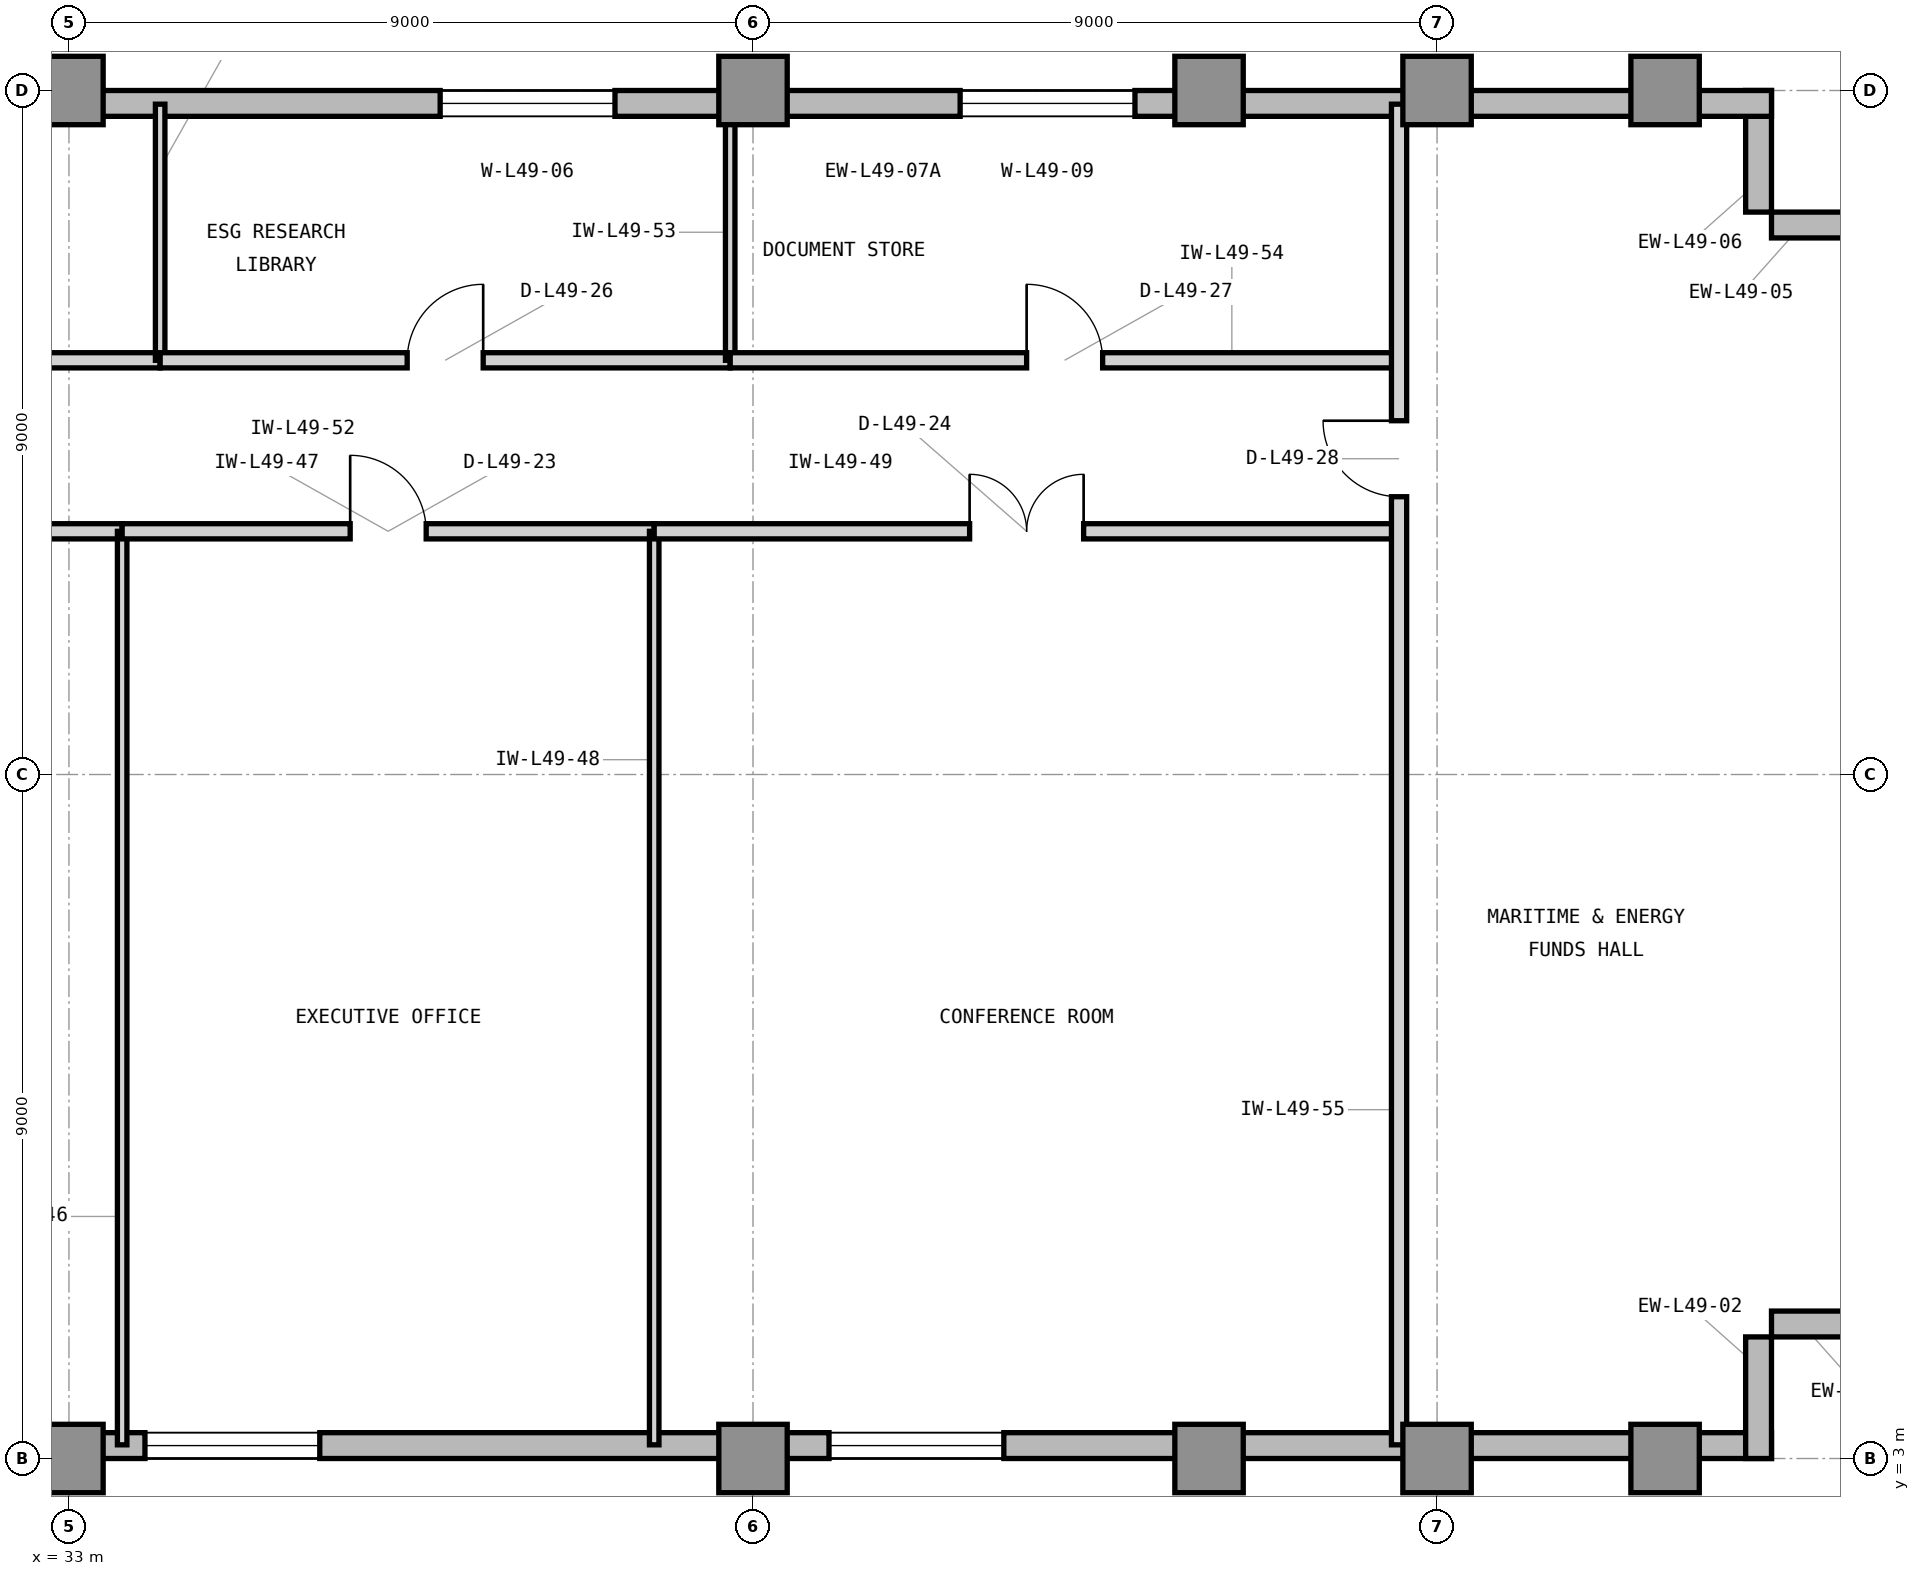
"""IFC4 building model, lengths in metres.
Left out: names, types, materials, properties, quantities, classifications, styles, units other than length and angle.
Written with IfcOpenShell. Run it as: python <this file> out.ifc"""

import sys

from ifc_helpers import new_model, si_unit, direction, frame, frame_2d, origin, origin_2d, place, context, subcontext, project, spatial, rectangle, extrude, element, fill, save


model = new_model("IFC4")
c1 = context("Model", 3, precision=1e-05, world=origin(), true_north=direction((0.0, 1.0)))
c2 = subcontext(c1, "Body", "Model", "MODEL_VIEW")
j1 = project(units=[si_unit("LENGTHUNIT", "METRE"), si_unit("PLANEANGLEUNIT", "RADIAN")], contexts=[c1])
p1 = place(None, origin())
s1 = spatial("IfcSite", under=j1, at=p1, CompositionType="ELEMENT")
p2 = place(p1, origin())
s2 = spatial("IfcBuilding", under=s1, at=p2, CompositionType="ELEMENT")
p3 = place(p2, frame((0.0, 0.0, 203.4)))
s3 = spatial("IfcBuildingStorey", under=s2, at=p3, CompositionType="ELEMENT", Elevation=203.4)
for number, where, z_axis, x_axis in (
    (1, (33.0, 3.0, 0.0), (0.0, 0.0, 1.0), (1.0, 0.0, 0.0)),
    (2, (33.0, 21.0, 0.0), (0.0, 0.0, 1.0), (1.0, 0.0, 0.0)),
    (3, (42.0, 3.0, 0.0), (0.0, 0.0, 1.0), (1.0, 0.0, 0.0)),
    (4, (42.0, 21.0, 0.0), (0.0, 0.0, 1.0), (1.0, 0.0, 0.0)),
    (5, (48.0, 3.0, 0.0), (0.0, 0.0, 1.0), (1.0, 0.0, 0.0)),
    (6, (48.0, 21.0, 0.0), (0.0, 0.0, 1.0), (1.0, 0.0, 0.0)),
    (7, (51.0, 3.0, 0.0), (0.0, 0.0, 1.0), (1.0, 0.0, 0.0)),
    (8, (51.0, 21.0, 0.0), (0.0, 0.0, 1.0), (1.0, 0.0, 0.0)),
    (9, (54.0, 3.0, 0.0), (0.0, 0.0, 1.0), (1.0, 0.0, 0.0)),
    (10, (54.0, 21.0, 0.0), (0.0, 0.0, 1.0), (1.0, 0.0, 0.0)),
):
    element("IfcColumn", number, at=place(p3, frame(where, z_axis=z_axis, x_axis=x_axis)), inside=s3, PredefinedType="COLUMN", context=c2, shape_type="SweptSolid", body=[
        extrude(rectangle(XDim=0.9, YDim=0.9, at=origin_2d()), origin(), (0.0, 0.0, 1.0), 3.9),
    ])
p4 = place(p3, frame((23.9, 3.17, 0.0), z_axis=(0.0, 0.0, 1.0), x_axis=(1.0, 0.0, 0.0)))
e11 = element("IfcWall", 11, at=p4, inside=s3, PredefinedType="STANDARD", context=c2, shape_type="SweptSolid", body=[
    extrude(rectangle(XDim=31.5, YDim=0.34, at=frame_2d((15.75, 0.0))), origin(), (0.0, 0.0, 1.0), 3.7),
])
p5 = place(p4, frame((5.6, 0.0, 0.9)))
e12 = element("IfcOpeningElement", 12, at=p5, cuts=e11, PredefinedType="OPENING", context=c2, shape_type="SweptSolid", body=[
    extrude(rectangle(XDim=2.3, YDim=2.2, at=frame_2d((1.15, 1.1))), frame((0.0, 0.18, 0.0), z_axis=(0.0, -1.0, 0.0), x_axis=(1.0, 0.0, 0.0)), (0.0, 0.0, 1.0), 0.36),
])
p6 = place(p4, frame((10.1, 0.0, 0.9)))
e13 = element("IfcOpeningElement", 13, at=p6, cuts=e11, PredefinedType="OPENING", context=c2, shape_type="SweptSolid", body=[
    extrude(rectangle(XDim=2.3, YDim=2.2, at=frame_2d((1.15, 1.1))), frame((0.0, 0.18, 0.0), z_axis=(0.0, -1.0, 0.0), x_axis=(1.0, 0.0, 0.0)), (0.0, 0.0, 1.0), 0.36),
])
p7 = place(p4, frame((19.1, 0.0, 0.9)))
e14 = element("IfcOpeningElement", 14, at=p7, cuts=e11, PredefinedType="OPENING", context=c2, shape_type="SweptSolid", body=[
    extrude(rectangle(XDim=2.3, YDim=2.2, at=frame_2d((1.15, 1.1))), frame((0.0, 0.18, 0.0), z_axis=(0.0, -1.0, 0.0), x_axis=(1.0, 0.0, 0.0)), (0.0, 0.0, 1.0), 0.36),
])
p8 = place(p4, frame((0.9, 0.0, 0.9)))
e15 = element("IfcOpeningElement", 15, at=p8, cuts=e11, PredefinedType="OPENING", context=c2, shape_type="SweptSolid", body=[
    extrude(rectangle(XDim=1.6, YDim=2.2, at=frame_2d((0.8, 1.1))), frame((0.0, 0.18, 0.0), z_axis=(0.0, -1.0, 0.0), x_axis=(1.0, 0.0, 0.0)), (0.0, 0.0, 1.0), 0.36),
])
for number, where, z_axis, x_axis in (
    (16, (55.23, 3.0, 0.0), (0.0, 0.0, 1.0), (0.0, 1.0, 0.0)),
    (17, (55.4, 4.77, 0.0), (0.0, 0.0, 1.0), (1.0, 0.0, 0.0)),
    (18, (57.0, 19.23, 0.0), (0.0, 0.0, 1.0), (-1.0, 0.0, 0.0)),
    (19, (55.23, 19.4, 0.0), (0.0, 0.0, 1.0), (0.0, 1.0, 0.0)),
):
    element("IfcWall", number, at=place(p3, frame(where, z_axis=z_axis, x_axis=x_axis)), inside=s3, PredefinedType="STANDARD", context=c2, shape_type="SweptSolid", body=[
        extrude(rectangle(XDim=1.6, YDim=0.34, at=frame_2d((0.8, 0.0))), origin(), (0.0, 0.0, 1.0), 3.7),
    ])
p9 = place(p3, frame((55.4, 20.83, 0.0), z_axis=(0.0, 0.0, 1.0), x_axis=(-1.0, 0.0, 0.0)))
e20 = element("IfcWall", 20, at=p9, inside=s3, PredefinedType="STANDARD", context=c2, shape_type="SweptSolid", body=[
    extrude(rectangle(XDim=23.38, YDim=0.34, at=frame_2d((11.69, 0.0))), origin(), (0.0, 0.0, 1.0), 3.7),
])
p10 = place(p9, frame((15.216, 0.0, 0.9)))
e21 = element("IfcOpeningElement", 21, at=p10, cuts=e20, PredefinedType="OPENING", context=c2, shape_type="SweptSolid", body=[
    extrude(rectangle(XDim=2.3, YDim=2.2, at=frame_2d((1.15, 1.1))), frame((0.0, 0.18, 0.0), z_axis=(0.0, -1.0, 0.0), x_axis=(1.0, 0.0, 0.0)), (0.0, 0.0, 1.0), 0.36),
])
p11 = place(p9, frame((8.375, 0.0, 0.9)))
e22 = element("IfcOpeningElement", 22, at=p11, cuts=e20, PredefinedType="OPENING", context=c2, shape_type="SweptSolid", body=[
    extrude(rectangle(XDim=2.3, YDim=2.2, at=frame_2d((1.15, 1.1))), frame((0.0, 0.18, 0.0), z_axis=(0.0, -1.0, 0.0), x_axis=(1.0, 0.0, 0.0)), (0.0, 0.0, 1.0), 0.36),
])
p12 = place(p3, frame((26.7, 15.2, 0.0), z_axis=(0.0, 0.0, 1.0), x_axis=(1.0, 0.0, 0.0)))
e23 = element("IfcWall", 23, at=p12, inside=s3, PredefinedType="PARTITIONING", context=c2, shape_type="SweptSolid", body=[
    extrude(rectangle(XDim=7.0, YDim=0.2, at=frame_2d((3.5, 0.0))), origin(), (0.0, 0.0, 1.0), 3.69),
])
p13 = place(p12, frame((2.5, 0.0, 0.0)))
e24 = element("IfcOpeningElement", 24, at=p13, cuts=e23, PredefinedType="OPENING", context=c2, shape_type="SweptSolid", body=[
    extrude(rectangle(XDim=2.0, YDim=2.5, at=frame_2d((1.0, 1.25))), frame((0.0, 0.11, 0.0), z_axis=(0.0, -1.0, 0.0), x_axis=(1.0, 0.0, 0.0)), (0.0, 0.0, 1.0), 0.22),
])
p14 = place(p3, frame((33.7, 3.18, 0.0), z_axis=(0.0, 0.0, 1.0), x_axis=(0.0, 1.0, 0.0)))
e25 = element("IfcWall", 25, at=p14, inside=s3, PredefinedType="PARTITIONING", context=c2, shape_type="SweptSolid", body=[
    extrude(rectangle(XDim=12.02, YDim=0.125, at=frame_2d((6.01, 0.0))), origin(), (0.0, 0.0, 1.0), 3.69),
])
p15 = place(p3, frame((33.7, 15.2, 0.0), z_axis=(0.0, 0.0, 1.0), x_axis=(1.0, 0.0, 0.0)))
e26 = element("IfcWall", 26, at=p15, inside=s3, PredefinedType="PARTITIONING", context=c2, shape_type="SweptSolid", body=[
    extrude(rectangle(XDim=7.0, YDim=0.2, at=frame_2d((3.5, 0.0))), origin(), (0.0, 0.0, 1.0), 3.69),
])
p16 = place(p15, frame((3.0, 0.0, 0.0)))
e27 = element("IfcOpeningElement", 27, at=p16, cuts=e26, PredefinedType="OPENING", context=c2, shape_type="SweptSolid", body=[
    extrude(rectangle(XDim=1.0, YDim=2.15, at=frame_2d((0.5, 1.075))), frame((0.0, 0.11, 0.0), z_axis=(0.0, -1.0, 0.0), x_axis=(1.0, 0.0, 0.0)), (0.0, 0.0, 1.0), 0.22),
])
p17 = place(p3, frame((40.7, 3.18, 0.0), z_axis=(0.0, 0.0, 1.0), x_axis=(0.0, 1.0, 0.0)))
e28 = element("IfcWall", 28, at=p17, inside=s3, PredefinedType="PARTITIONING", context=c2, shape_type="SweptSolid", body=[
    extrude(rectangle(XDim=12.02, YDim=0.125, at=frame_2d((6.01, 0.0))), origin(), (0.0, 0.0, 1.0), 3.69),
])
p18 = place(p3, frame((40.7, 15.2, 0.0), z_axis=(0.0, 0.0, 1.0), x_axis=(1.0, 0.0, 0.0)))
e29 = element("IfcWall", 29, at=p18, inside=s3, PredefinedType="PARTITIONING", context=c2, shape_type="SweptSolid", body=[
    extrude(rectangle(XDim=9.8, YDim=0.2, at=frame_2d((4.9, 0.0))), origin(), (0.0, 0.0, 1.0), 3.69),
])
p19 = place(p18, frame((4.15, 0.0, 0.0)))
e30 = element("IfcOpeningElement", 30, at=p19, cuts=e29, PredefinedType="OPENING", context=c2, shape_type="SweptSolid", body=[
    extrude(rectangle(XDim=1.5, YDim=2.3, at=frame_2d((0.75, 1.15))), frame((0.0, 0.11, 0.0), z_axis=(0.0, -1.0, 0.0), x_axis=(1.0, 0.0, 0.0)), (0.0, 0.0, 1.0), 0.22),
])
p20 = place(p3, frame((26.7, 17.45, 0.0), z_axis=(0.0, 0.0, 1.0), x_axis=(1.0, 0.0, 0.0)))
e31 = element("IfcWall", 31, at=p20, inside=s3, PredefinedType="PARTITIONING", context=c2, shape_type="SweptSolid", body=[
    extrude(rectangle(XDim=7.5, YDim=0.2, at=frame_2d((3.75, 0.0))), origin(), (0.0, 0.0, 1.0), 3.69),
])
p21 = place(p20, frame((3.0, 0.0, 0.0)))
e32 = element("IfcOpeningElement", 32, at=p21, cuts=e31, PredefinedType="OPENING", context=c2, shape_type="SweptSolid", body=[
    extrude(rectangle(XDim=1.5, YDim=2.3, at=frame_2d((0.75, 1.15))), frame((0.0, 0.11, 0.0), z_axis=(0.0, -1.0, 0.0), x_axis=(1.0, 0.0, 0.0)), (0.0, 0.0, 1.0), 0.22),
])
p22 = place(p3, frame((34.2, 17.45, 0.0), z_axis=(0.0, 0.0, 1.0), x_axis=(0.0, 1.0, 0.0)))
e33 = element("IfcWall", 33, at=p22, inside=s3, PredefinedType="PARTITIONING", context=c2, shape_type="SweptSolid", body=[
    extrude(rectangle(XDim=3.37, YDim=0.125, at=frame_2d((1.685, 0.0))), origin(), (0.0, 0.0, 1.0), 3.69),
])
p23 = place(p3, frame((34.2, 17.45, 0.0), z_axis=(0.0, 0.0, 1.0), x_axis=(1.0, 0.0, 0.0)))
e34 = element("IfcWall", 34, at=p23, inside=s3, PredefinedType="PARTITIONING", context=c2, shape_type="SweptSolid", body=[
    extrude(rectangle(XDim=7.5, YDim=0.2, at=frame_2d((3.75, 0.0))), origin(), (0.0, 0.0, 1.0), 3.69),
])
p24 = place(p23, frame((3.25, 0.0, 0.0)))
e35 = element("IfcOpeningElement", 35, at=p24, cuts=e34, PredefinedType="OPENING", context=c2, shape_type="SweptSolid", body=[
    extrude(rectangle(XDim=1.0, YDim=2.15, at=frame_2d((0.5, 1.075))), frame((0.0, 0.11, 0.0), z_axis=(0.0, -1.0, 0.0), x_axis=(1.0, 0.0, 0.0)), (0.0, 0.0, 1.0), 0.22),
])
p25 = place(p3, frame((41.7, 17.45, 0.0), z_axis=(0.0, 0.0, 1.0), x_axis=(0.0, 1.0, 0.0)))
e36 = element("IfcWall", 36, at=p25, inside=s3, PredefinedType="PARTITIONING", context=c2, shape_type="SweptSolid", body=[
    extrude(rectangle(XDim=3.37, YDim=0.125, at=frame_2d((1.685, 0.0))), origin(), (0.0, 0.0, 1.0), 3.69),
])
p26 = place(p3, frame((41.7, 17.45, 0.0), z_axis=(0.0, 0.0, 1.0), x_axis=(1.0, 0.0, 0.0)))
e37 = element("IfcWall", 37, at=p26, inside=s3, PredefinedType="PARTITIONING", context=c2, shape_type="SweptSolid", body=[
    extrude(rectangle(XDim=8.8, YDim=0.2, at=frame_2d((4.4, 0.0))), origin(), (0.0, 0.0, 1.0), 3.69),
])
p27 = place(p26, frame((3.9, 0.0, 0.0)))
e38 = element("IfcOpeningElement", 38, at=p27, cuts=e37, PredefinedType="OPENING", context=c2, shape_type="SweptSolid", body=[
    extrude(rectangle(XDim=1.0, YDim=2.15, at=frame_2d((0.5, 1.075))), frame((0.0, 0.11, 0.0), z_axis=(0.0, -1.0, 0.0), x_axis=(1.0, 0.0, 0.0)), (0.0, 0.0, 1.0), 0.22),
])
p28 = place(p3, frame((50.5, 3.18, 0.0), z_axis=(0.0, 0.0, 1.0), x_axis=(0.0, 1.0, 0.0)))
e39 = element("IfcWall", 39, at=p28, inside=s3, PredefinedType="PARTITIONING", context=c2, shape_type="SweptSolid", body=[
    extrude(rectangle(XDim=17.64, YDim=0.2, at=frame_2d((8.82, 0.0))), origin(), (0.0, 0.0, 1.0), 3.69),
])
p29 = place(p28, frame((12.475, 0.0, 0.0)))
e40 = element("IfcOpeningElement", 40, at=p29, cuts=e39, PredefinedType="OPENING", context=c2, shape_type="SweptSolid", body=[
    extrude(rectangle(XDim=1.0, YDim=2.15, at=frame_2d((0.5, 1.075))), frame((0.0, 0.11, 0.0), z_axis=(0.0, -1.0, 0.0), x_axis=(1.0, 0.0, 0.0)), (0.0, 0.0, 1.0), 0.22),
])
p30 = place(p6, origin())
e41 = element("IfcWindow", 41, at=p30, inside=s3, PartitioningType="SINGLE_PANEL", PredefinedType="WINDOW", context=c2, shape_type="SweptSolid", body=[
    extrude(rectangle(XDim=2.3, YDim=2.2, at=frame_2d((1.15, 1.1))), frame((0.0, 0.11, 0.0), z_axis=(0.0, -1.0, 0.0), x_axis=(1.0, 0.0, 0.0)), (0.0, 0.0, 1.0), 0.06),
])
fill(e13, e41)
p31 = place(p7, origin())
e42 = element("IfcWindow", 42, at=p31, inside=s3, PartitioningType="SINGLE_PANEL", PredefinedType="WINDOW", context=c2, shape_type="SweptSolid", body=[
    extrude(rectangle(XDim=2.3, YDim=2.2, at=frame_2d((1.15, 1.1))), frame((0.0, 0.11, 0.0), z_axis=(0.0, -1.0, 0.0), x_axis=(1.0, 0.0, 0.0)), (0.0, 0.0, 1.0), 0.06),
])
fill(e14, e42)
p32 = place(p10, origin())
e43 = element("IfcWindow", 43, at=p32, inside=s3, PartitioningType="SINGLE_PANEL", PredefinedType="WINDOW", context=c2, shape_type="SweptSolid", body=[
    extrude(rectangle(XDim=2.3, YDim=2.2, at=frame_2d((1.15, 1.1))), frame((0.0, 0.11, 0.0), z_axis=(0.0, -1.0, 0.0), x_axis=(1.0, 0.0, 0.0)), (0.0, 0.0, 1.0), 0.06),
])
fill(e21, e43)
p33 = place(p16, origin())
e44 = element("IfcDoor", 44, at=p33, inside=s3, OperationType="SINGLE_SWING_LEFT", PredefinedType="DOOR", context=c2, shape_type="SweptSolid", body=[
    extrude(rectangle(XDim=1.0, YDim=2.15, at=frame_2d((0.5, 1.075))), frame((0.0, 0.025, 0.0), z_axis=(0.0, -1.0, 0.0), x_axis=(1.0, 0.0, 0.0)), (0.0, 0.0, 1.0), 0.05),
])
fill(e27, e44)
p34 = place(p19, origin())
e45 = element("IfcDoor", 45, at=p34, inside=s3, OperationType="DOUBLE_DOOR_SINGLE_SWING", PredefinedType="DOOR", context=c2, shape_type="SweptSolid", body=[
    extrude(rectangle(XDim=1.5, YDim=2.3, at=frame_2d((0.75, 1.15))), frame((0.0, 0.025, 0.0), z_axis=(0.0, -1.0, 0.0), x_axis=(1.0, 0.0, 0.0)), (0.0, 0.0, 1.0), 0.05),
])
fill(e30, e45)
p35 = place(p24, origin())
e46 = element("IfcDoor", 46, at=p35, inside=s3, OperationType="SINGLE_SWING_RIGHT", PredefinedType="DOOR", context=c2, shape_type="SweptSolid", body=[
    extrude(rectangle(XDim=1.0, YDim=2.15, at=frame_2d((0.5, 1.075))), frame((0.0, 0.025, 0.0), z_axis=(0.0, -1.0, 0.0), x_axis=(1.0, 0.0, 0.0)), (0.0, 0.0, 1.0), 0.05),
])
fill(e35, e46)
p36 = place(p27, origin())
e47 = element("IfcDoor", 47, at=p36, inside=s3, OperationType="SINGLE_SWING_LEFT", PredefinedType="DOOR", context=c2, shape_type="SweptSolid", body=[
    extrude(rectangle(XDim=1.0, YDim=2.15, at=frame_2d((0.5, 1.075))), frame((0.0, 0.025, 0.0), z_axis=(0.0, -1.0, 0.0), x_axis=(1.0, 0.0, 0.0)), (0.0, 0.0, 1.0), 0.05),
])
fill(e38, e47)
p37 = place(p29, origin())
e48 = element("IfcDoor", 48, at=p37, inside=s3, OperationType="SINGLE_SWING_RIGHT", PredefinedType="DOOR", context=c2, shape_type="SweptSolid", body=[
    extrude(rectangle(XDim=1.0, YDim=2.15, at=frame_2d((0.5, 1.075))), frame((0.0, 0.025, 0.0), z_axis=(0.0, -1.0, 0.0), x_axis=(1.0, 0.0, 0.0)), (0.0, 0.0, 1.0), 0.05),
])
fill(e40, e48)
p38 = place(p11, origin())
e49 = element("IfcWindow", 49, at=p38, inside=s3, PartitioningType="SINGLE_PANEL", PredefinedType="WINDOW", context=c2, shape_type="SweptSolid", body=[
    extrude(rectangle(XDim=2.3, YDim=2.2, at=frame_2d((1.15, 1.1))), frame((0.0, 0.11, 0.0), z_axis=(0.0, -1.0, 0.0), x_axis=(1.0, 0.0, 0.0)), (0.0, 0.0, 1.0), 0.06),
])
fill(e22, e49)
save(model, sys.argv[1])
